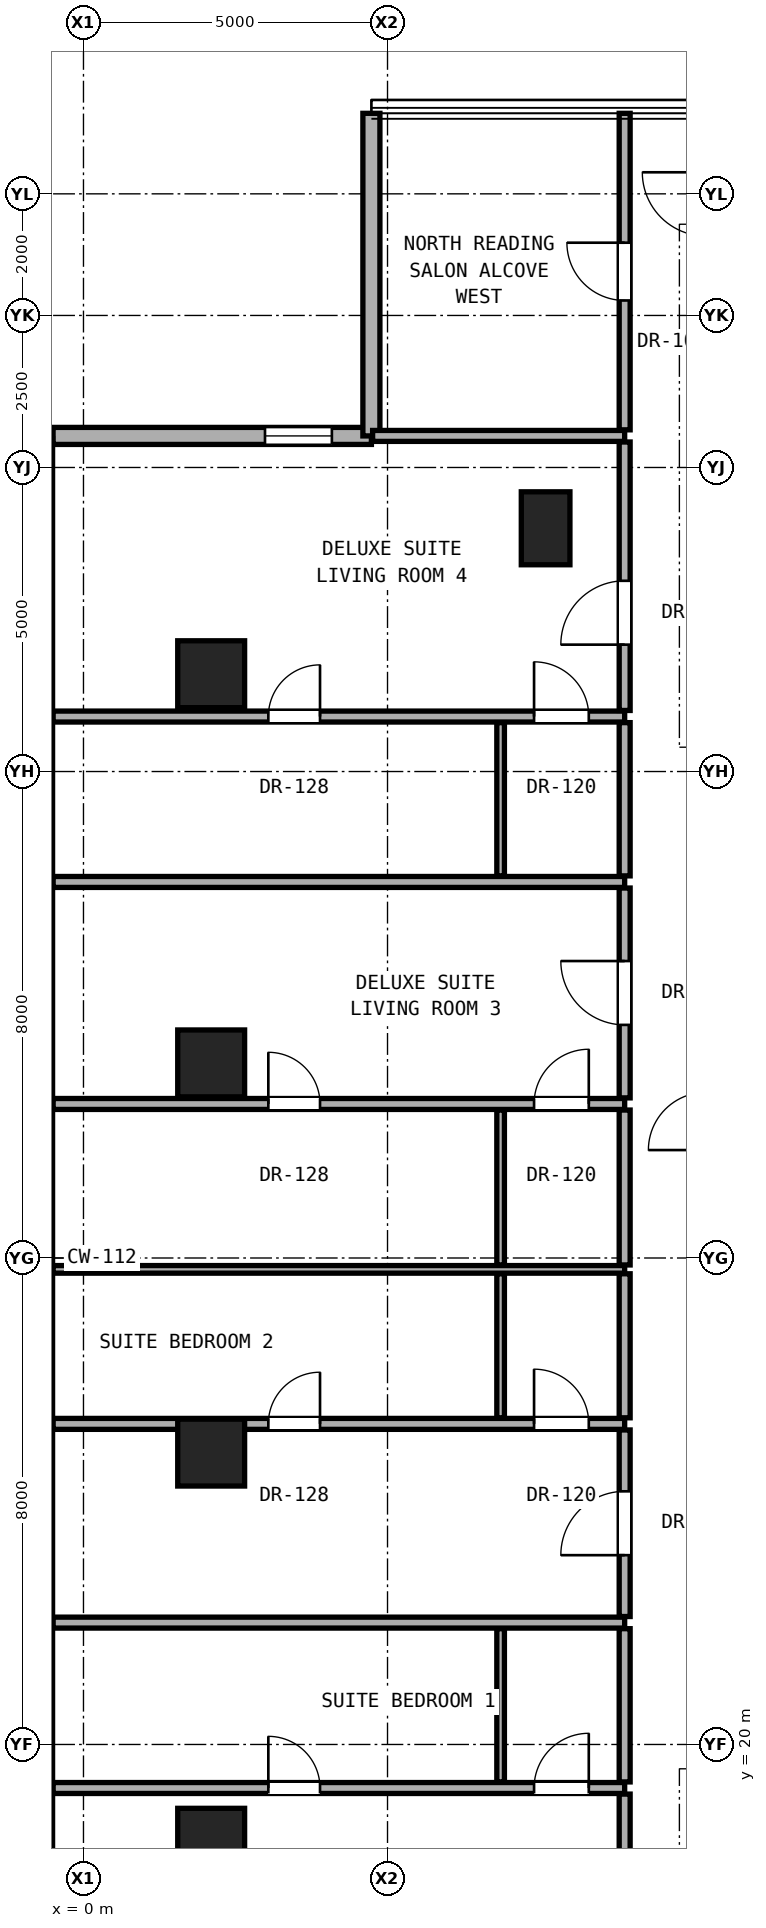
"""IFC4 building model, lengths in metres.
Left out: names, types, materials, properties, quantities, classifications, styles, units other than length and angle.
Written with IfcOpenShell. Run it as: python <this file> out.ifc"""

import sys

from ifc_helpers import new_model, si_unit, direction, frame, frame_2d, origin, origin_2d, place, context, subcontext, project, spatial, rectangle, hollow_rectangle, extrude, element, fill, save


model = new_model("IFC4")
c1 = context("Model", 3, precision=1e-05, world=origin(), true_north=direction((0.0, 1.0)))
c2 = subcontext(c1, "Body", "Model", "MODEL_VIEW")
j1 = project(units=[si_unit("LENGTHUNIT", "METRE"), si_unit("PLANEANGLEUNIT", "RADIAN")], contexts=[c1])
p1 = place(None, origin())
s1 = spatial("IfcSite", under=j1, at=p1, CompositionType="ELEMENT")
p2 = place(p1, origin())
s2 = spatial("IfcBuilding", under=s1, at=p2, CompositionType="ELEMENT")
p3 = place(p2, frame((0.0, 0.0, 98.3)))
s3 = spatial("IfcBuildingStorey", under=s2, at=p3, CompositionType="ELEMENT", Elevation=98.3)
for number, where, z_axis, x_axis in (
    (1, (2.1, 18.4, 0.0), (0.0, 0.0, 1.0), (1.0, 0.0, 0.0)),
    (2, (2.1, 24.8, 0.0), (0.0, 0.0, 1.0), (1.0, 0.0, 0.0)),
    (3, (2.1, 31.2, 0.0), (0.0, 0.0, 1.0), (1.0, 0.0, 0.0)),
    (4, (2.1, 37.6, 0.0), (0.0, 0.0, 1.0), (1.0, 0.0, 0.0)),
):
    element("IfcColumn", number, at=place(p3, frame(where, z_axis=z_axis, x_axis=x_axis)), inside=s3, PredefinedType="COLUMN", context=c2, shape_type="SweptSolid", body=[
        extrude(hollow_rectangle(XDim=1.1, YDim=1.1, WallThickness=0.06, at=origin_2d()), origin(), (0.0, 0.0, 1.0), 3.3),
    ])
p4 = place(p3, frame((7.6, 40.0, 0.0), z_axis=(0.0, 0.0, 1.0), x_axis=(1.0, 0.0, 0.0)))
e5 = element("IfcColumn", 5, at=p4, inside=s3, PredefinedType="PILASTER", context=c2, shape_type="SweptSolid", body=[
    extrude(rectangle(XDim=0.8, YDim=1.2, at=origin_2d()), origin(), (0.0, 0.0, 1.0), 3.3),
])
p5 = place(p3, frame((4.735, 41.519, 0.0), z_axis=(0.0, 0.0, 1.0), x_axis=(-1.0, 0.0, 0.0)))
e6 = element("IfcWall", 6, at=p5, inside=s3, PredefinedType="SOLIDWALL", context=c2, shape_type="SweptSolid", body=[
    extrude(rectangle(XDim=5.305, YDim=0.28, at=frame_2d((2.653, 0.0))), origin(), (0.0, 0.0, 1.0), 3.06),
])
p6 = place(p5, frame((0.65, 0.0, 0.85)))
e7 = element("IfcOpeningElement", 7, at=p6, cuts=e6, PredefinedType="OPENING", context=c2, shape_type="SweptSolid", body=[
    extrude(rectangle(XDim=1.1, YDim=2.0, at=frame_2d((0.55, 1.0))), frame((0.0, 0.15, 0.0), z_axis=(0.0, -1.0, 0.0), x_axis=(1.0, 0.0, 0.0)), (0.0, 0.0, 1.0), 0.3),
])
p7 = place(p3, frame((4.735, 46.824, 0.0), z_axis=(0.0, 0.0, 1.0), x_axis=(0.0, -1.0, 0.0)))
e8 = element("IfcWall", 8, at=p7, inside=s3, PredefinedType="SOLIDWALL", context=c2, shape_type="SweptSolid", body=[
    extrude(rectangle(XDim=5.305, YDim=0.28, at=frame_2d((2.652, 0.0))), origin(), (0.0, 0.0, 1.0), 3.06),
])
p8 = place(p3, frame((-0.57, 19.284, 0.0), z_axis=(0.0, 0.0, 1.0), x_axis=(1.0, 0.0, 0.0)))
e9 = element("IfcWall", 9, at=p8, inside=s3, PredefinedType="PARTITIONING", context=c2, shape_type="SweptSolid", body=[
    extrude(rectangle(XDim=9.47, YDim=0.18, at=frame_2d((4.735, 0.0))), origin(), (0.0, 0.0, 1.0), 2.145),
])
p9 = place(p8, frame((3.61, 0.0, 0.0)))
e10 = element("IfcOpeningElement", 10, at=p9, cuts=e9, PredefinedType="OPENING", context=c2, shape_type="SweptSolid", body=[
    extrude(rectangle(XDim=0.85, YDim=2.01, at=frame_2d((0.425, 1.005))), frame((0.0, 0.1, 0.0), z_axis=(0.0, -1.0, 0.0), x_axis=(1.0, 0.0, 0.0)), (0.0, 0.0, 1.0), 0.2),
])
p10 = place(p8, frame((7.98, 0.0, 0.0)))
e11 = element("IfcOpeningElement", 11, at=p10, cuts=e9, PredefinedType="OPENING", context=c2, shape_type="SweptSolid", body=[
    extrude(rectangle(XDim=0.9, YDim=2.1, at=frame_2d((0.45, 1.05))), frame((0.0, 0.1, 0.0), z_axis=(0.0, -1.0, 0.0), x_axis=(1.0, 0.0, 0.0)), (0.0, 0.0, 1.0), 0.2),
])
p11 = place(p3, frame((-0.57, 22.004, 0.0), z_axis=(0.0, 0.0, 1.0), x_axis=(1.0, 0.0, 0.0)))
e12 = element("IfcWall", 12, at=p11, inside=s3, PredefinedType="PARTITIONING", context=c2, shape_type="SweptSolid", body=[
    extrude(rectangle(XDim=9.47, YDim=0.18, at=frame_2d((4.735, 0.0))), origin(), (0.0, 0.0, 1.0), 2.145),
])
p12 = place(p3, frame((-0.57, 25.272, 0.0), z_axis=(0.0, 0.0, 1.0), x_axis=(1.0, 0.0, 0.0)))
e13 = element("IfcWall", 13, at=p12, inside=s3, PredefinedType="PARTITIONING", context=c2, shape_type="SweptSolid", body=[
    extrude(rectangle(XDim=9.47, YDim=0.18, at=frame_2d((4.735, 0.0))), origin(), (0.0, 0.0, 1.0), 2.145),
])
p13 = place(p12, frame((3.61, 0.0, 0.0)))
e14 = element("IfcOpeningElement", 14, at=p13, cuts=e13, PredefinedType="OPENING", context=c2, shape_type="SweptSolid", body=[
    extrude(rectangle(XDim=0.85, YDim=2.01, at=frame_2d((0.425, 1.005))), frame((0.0, 0.1, 0.0), z_axis=(0.0, -1.0, 0.0), x_axis=(1.0, 0.0, 0.0)), (0.0, 0.0, 1.0), 0.2),
])
p14 = place(p12, frame((7.98, 0.0, 0.0)))
e15 = element("IfcOpeningElement", 15, at=p14, cuts=e13, PredefinedType="OPENING", context=c2, shape_type="SweptSolid", body=[
    extrude(rectangle(XDim=0.9, YDim=2.1, at=frame_2d((0.45, 1.05))), frame((0.0, 0.1, 0.0), z_axis=(0.0, -1.0, 0.0), x_axis=(1.0, 0.0, 0.0)), (0.0, 0.0, 1.0), 0.2),
])
p15 = place(p3, frame((-0.57, 27.813, 0.0), z_axis=(0.0, 0.0, 1.0), x_axis=(1.0, 0.0, 0.0)))
e16 = element("IfcWall", 16, at=p15, inside=s3, PredefinedType="PARTITIONING", context=c2, shape_type="SweptSolid", body=[
    extrude(rectangle(XDim=9.47, YDim=0.125, at=frame_2d((4.735, 0.0))), origin(), (0.0, 0.0, 1.0), 2.145),
])
p16 = place(p3, frame((-0.57, 30.533, 0.0), z_axis=(0.0, 0.0, 1.0), x_axis=(1.0, 0.0, 0.0)))
e17 = element("IfcWall", 17, at=p16, inside=s3, PredefinedType="PARTITIONING", context=c2, shape_type="SweptSolid", body=[
    extrude(rectangle(XDim=9.47, YDim=0.18, at=frame_2d((4.735, 0.0))), origin(), (0.0, 0.0, 1.0), 2.145),
])
p17 = place(p16, frame((3.61, 0.0, 0.0)))
e18 = element("IfcOpeningElement", 18, at=p17, cuts=e17, PredefinedType="OPENING", context=c2, shape_type="SweptSolid", body=[
    extrude(rectangle(XDim=0.85, YDim=2.01, at=frame_2d((0.425, 1.005))), frame((0.0, 0.1, 0.0), z_axis=(0.0, -1.0, 0.0), x_axis=(1.0, 0.0, 0.0)), (0.0, 0.0, 1.0), 0.2),
])
p18 = place(p16, frame((7.98, 0.0, 0.0)))
e19 = element("IfcOpeningElement", 19, at=p18, cuts=e17, PredefinedType="OPENING", context=c2, shape_type="SweptSolid", body=[
    extrude(rectangle(XDim=0.9, YDim=2.1, at=frame_2d((0.45, 1.05))), frame((0.0, 0.1, 0.0), z_axis=(0.0, -1.0, 0.0), x_axis=(1.0, 0.0, 0.0)), (0.0, 0.0, 1.0), 0.2),
])
p19 = place(p3, frame((-0.57, 34.184, 0.0), z_axis=(0.0, 0.0, 1.0), x_axis=(1.0, 0.0, 0.0)))
e20 = element("IfcWall", 20, at=p19, inside=s3, PredefinedType="PARTITIONING", context=c2, shape_type="SweptSolid", body=[
    extrude(rectangle(XDim=9.47, YDim=0.18, at=frame_2d((4.735, 0.0))), origin(), (0.0, 0.0, 1.0), 2.145),
])
p20 = place(p3, frame((-0.57, 36.904, 0.0), z_axis=(0.0, 0.0, 1.0), x_axis=(1.0, 0.0, 0.0)))
e21 = element("IfcWall", 21, at=p20, inside=s3, PredefinedType="PARTITIONING", context=c2, shape_type="SweptSolid", body=[
    extrude(rectangle(XDim=9.47, YDim=0.18, at=frame_2d((4.735, 0.0))), origin(), (0.0, 0.0, 1.0), 2.145),
])
p21 = place(p20, frame((3.61, 0.0, 0.0)))
e22 = element("IfcOpeningElement", 22, at=p21, cuts=e21, PredefinedType="OPENING", context=c2, shape_type="SweptSolid", body=[
    extrude(rectangle(XDim=0.85, YDim=2.01, at=frame_2d((0.425, 1.005))), frame((0.0, 0.1, 0.0), z_axis=(0.0, -1.0, 0.0), x_axis=(1.0, 0.0, 0.0)), (0.0, 0.0, 1.0), 0.2),
])
p22 = place(p20, frame((7.98, 0.0, 0.0)))
e23 = element("IfcOpeningElement", 23, at=p22, cuts=e21, PredefinedType="OPENING", context=c2, shape_type="SweptSolid", body=[
    extrude(rectangle(XDim=0.9, YDim=2.1, at=frame_2d((0.45, 1.05))), frame((0.0, 0.1, 0.0), z_axis=(0.0, -1.0, 0.0), x_axis=(1.0, 0.0, 0.0)), (0.0, 0.0, 1.0), 0.2),
])
p23 = place(p3, frame((4.755, 41.519, 0.0), z_axis=(0.0, 0.0, 1.0), x_axis=(1.0, 0.0, 0.0)))
e24 = element("IfcWall", 24, at=p23, inside=s3, PredefinedType="PARTITIONING", context=c2, shape_type="SweptSolid", body=[
    extrude(rectangle(XDim=4.145, YDim=0.18, at=frame_2d((2.073, 0.0))), origin(), (0.0, 0.0, 1.0), 3.08),
])
p24 = place(p3, frame((6.86, 19.384, 0.0), z_axis=(0.0, 0.0, 1.0), x_axis=(0.0, 1.0, 0.0)))
e25 = element("IfcWall", 25, at=p24, inside=s3, PredefinedType="PARTITIONING", context=c2, shape_type="SweptSolid", body=[
    extrude(rectangle(XDim=2.52, YDim=0.125, at=frame_2d((1.26, 0.0))), origin(), (0.0, 0.0, 1.0), 3.08),
])
p25 = place(p3, frame((6.86, 25.372, 0.0), z_axis=(0.0, 0.0, 1.0), x_axis=(0.0, 1.0, 0.0)))
e26 = element("IfcWall", 26, at=p25, inside=s3, PredefinedType="PARTITIONING", context=c2, shape_type="SweptSolid", body=[
    extrude(rectangle(XDim=2.368, YDim=0.125, at=frame_2d((1.184, 0.0))), origin(), (0.0, 0.0, 1.0), 3.08),
])
p26 = place(p3, frame((6.86, 27.885, 0.0), z_axis=(0.0, 0.0, 1.0), x_axis=(0.0, 1.0, 0.0)))
e27 = element("IfcWall", 27, at=p26, inside=s3, PredefinedType="PARTITIONING", context=c2, shape_type="SweptSolid", body=[
    extrude(rectangle(XDim=2.548, YDim=0.125, at=frame_2d((1.274, 0.0))), origin(), (0.0, 0.0, 1.0), 3.08),
])
p27 = place(p3, frame((6.86, 34.284, 0.0), z_axis=(0.0, 0.0, 1.0), x_axis=(0.0, 1.0, 0.0)))
e28 = element("IfcWall", 28, at=p27, inside=s3, PredefinedType="PARTITIONING", context=c2, shape_type="SweptSolid", body=[
    extrude(rectangle(XDim=2.52, YDim=0.125, at=frame_2d((1.26, 0.0))), origin(), (0.0, 0.0, 1.0), 3.08),
])
p28 = place(p3, frame((8.9, 14.581, 0.0), z_axis=(0.0, 0.0, 1.0), x_axis=(0.0, 1.0, 0.0)))
e29 = element("IfcWall", 29, at=p28, inside=s3, PredefinedType="PARTITIONING", context=c2, shape_type="SweptSolid", body=[
    extrude(rectangle(XDim=4.603, YDim=0.18, at=frame_2d((2.302, 0.0))), origin(), (0.0, 0.0, 1.0), 2.456),
])
p29 = place(p28, frame((2.376, 0.0, 0.0)))
e30 = element("IfcOpeningElement", 30, at=p29, cuts=e29, PredefinedType="OPENING", context=c2, shape_type="SweptSolid", body=[
    extrude(rectangle(XDim=1.05, YDim=2.2, at=frame_2d((0.525, 1.1))), frame((0.0, 0.1, 0.0), z_axis=(0.0, -1.0, 0.0), x_axis=(1.0, 0.0, 0.0)), (0.0, 0.0, 1.0), 0.2),
])
p30 = place(p3, frame((8.9, 19.384, 0.0), z_axis=(0.0, 0.0, 1.0), x_axis=(0.0, 1.0, 0.0)))
e31 = element("IfcWall", 31, at=p30, inside=s3, PredefinedType="PARTITIONING", context=c2, shape_type="SweptSolid", body=[
    extrude(rectangle(XDim=2.52, YDim=0.18, at=frame_2d((1.26, 0.0))), origin(), (0.0, 0.0, 1.0), 3.08),
])
p31 = place(p3, frame((8.9, 22.104, 0.0), z_axis=(0.0, 0.0, 1.0), x_axis=(0.0, 1.0, 0.0)))
e32 = element("IfcWall", 32, at=p31, inside=s3, PredefinedType="PARTITIONING", context=c2, shape_type="SweptSolid", body=[
    extrude(rectangle(XDim=3.068, YDim=0.18, at=frame_2d((1.534, 0.0))), origin(), (0.0, 0.0, 1.0), 2.299),
])
p32 = place(p31, frame((1.009, 0.0, 0.0)))
e33 = element("IfcOpeningElement", 33, at=p32, cuts=e32, PredefinedType="OPENING", context=c2, shape_type="SweptSolid", body=[
    extrude(rectangle(XDim=1.05, YDim=2.2, at=frame_2d((0.525, 1.1))), frame((0.0, 0.1, 0.0), z_axis=(0.0, -1.0, 0.0), x_axis=(1.0, 0.0, 0.0)), (0.0, 0.0, 1.0), 0.2),
])
p33 = place(p3, frame((8.9, 25.372, 0.0), z_axis=(0.0, 0.0, 1.0), x_axis=(0.0, 1.0, 0.0)))
e34 = element("IfcWall", 34, at=p33, inside=s3, PredefinedType="PARTITIONING", context=c2, shape_type="SweptSolid", body=[
    extrude(rectangle(XDim=2.368, YDim=0.18, at=frame_2d((1.184, 0.0))), origin(), (0.0, 0.0, 1.0), 3.08),
])
p34 = place(p3, frame((8.9, 27.885, 0.0), z_axis=(0.0, 0.0, 1.0), x_axis=(0.0, 1.0, 0.0)))
e35 = element("IfcWall", 35, at=p34, inside=s3, PredefinedType="PARTITIONING", context=c2, shape_type="SweptSolid", body=[
    extrude(rectangle(XDim=2.548, YDim=0.18, at=frame_2d((1.274, 0.0))), origin(), (0.0, 0.0, 1.0), 3.08),
])
p35 = place(p3, frame((8.9, 30.633, 0.0), z_axis=(0.0, 0.0, 1.0), x_axis=(0.0, 1.0, 0.0)))
e36 = element("IfcWall", 36, at=p35, inside=s3, PredefinedType="PARTITIONING", context=c2, shape_type="SweptSolid", body=[
    extrude(rectangle(XDim=3.451, YDim=0.18, at=frame_2d((1.726, 0.0))), origin(), (0.0, 0.0, 1.0), 2.299),
])
p36 = place(p35, frame((1.2, 0.0, 0.0)))
e37 = element("IfcOpeningElement", 37, at=p36, cuts=e36, PredefinedType="OPENING", context=c2, shape_type="SweptSolid", body=[
    extrude(rectangle(XDim=1.05, YDim=2.2, at=frame_2d((0.525, 1.1))), frame((0.0, 0.1, 0.0), z_axis=(0.0, -1.0, 0.0), x_axis=(1.0, 0.0, 0.0)), (0.0, 0.0, 1.0), 0.2),
])
p37 = place(p3, frame((8.9, 34.284, 0.0), z_axis=(0.0, 0.0, 1.0), x_axis=(0.0, 1.0, 0.0)))
e38 = element("IfcWall", 38, at=p37, inside=s3, PredefinedType="PARTITIONING", context=c2, shape_type="SweptSolid", body=[
    extrude(rectangle(XDim=2.52, YDim=0.18, at=frame_2d((1.26, 0.0))), origin(), (0.0, 0.0, 1.0), 3.08),
])
p38 = place(p3, frame((8.9, 37.004, 0.0), z_axis=(0.0, 0.0, 1.0), x_axis=(0.0, 1.0, 0.0)))
e39 = element("IfcWall", 39, at=p38, inside=s3, PredefinedType="PARTITIONING", context=c2, shape_type="SweptSolid", body=[
    extrude(rectangle(XDim=4.415, YDim=0.18, at=frame_2d((2.208, 0.0))), origin(), (0.0, 0.0, 1.0), 2.456),
])
p39 = place(p38, frame((1.083, 0.0, 0.0)))
e40 = element("IfcOpeningElement", 40, at=p39, cuts=e39, PredefinedType="OPENING", context=c2, shape_type="SweptSolid", body=[
    extrude(rectangle(XDim=1.05, YDim=2.2, at=frame_2d((0.525, 1.1))), frame((0.0, 0.1, 0.0), z_axis=(0.0, -1.0, 0.0), x_axis=(1.0, 0.0, 0.0)), (0.0, 0.0, 1.0), 0.2),
])
p40 = place(p3, frame((8.9, 41.619, 0.0), z_axis=(0.0, 0.0, 1.0), x_axis=(0.0, 1.0, 0.0)))
e41 = element("IfcWall", 41, at=p40, inside=s3, PredefinedType="PARTITIONING", context=c2, shape_type="SweptSolid", body=[
    extrude(rectangle(XDim=5.205, YDim=0.18, at=frame_2d((2.603, 0.0))), origin(), (0.0, 0.0, 1.0), 3.08),
])
p41 = place(p40, frame((2.127, 0.0, 0.0)))
e42 = element("IfcOpeningElement", 42, at=p41, cuts=e41, PredefinedType="OPENING", context=c2, shape_type="SweptSolid", body=[
    extrude(rectangle(XDim=0.95, YDim=2.15, at=frame_2d((0.475, 1.075))), frame((0.0, 0.1, 0.0), z_axis=(0.0, -1.0, 0.0), x_axis=(1.0, 0.0, 0.0)), (0.0, 0.0, 1.0), 0.2),
])
p42 = place(p6, origin())
e43 = element("IfcWindow", 43, at=p42, inside=s3, PartitioningType="SINGLE_PANEL", PredefinedType="WINDOW", context=c2, shape_type="SweptSolid", body=[
    extrude(rectangle(XDim=1.1, YDim=2.0, at=frame_2d((0.55, 1.0))), frame((0.0, 0.03, 0.0), z_axis=(0.0, -1.0, 0.0), x_axis=(1.0, 0.0, 0.0)), (0.0, 0.0, 1.0), 0.06),
])
fill(e7, e43)
p43 = place(p9, origin())
e44 = element("IfcDoor", 44, at=p43, inside=s3, OperationType="SINGLE_SWING_LEFT", PredefinedType="DOOR", context=c2, shape_type="SweptSolid", body=[
    extrude(rectangle(XDim=0.85, YDim=2.01, at=frame_2d((0.425, 1.005))), frame((0.0, 0.025, 0.0), z_axis=(0.0, -1.0, 0.0), x_axis=(1.0, 0.0, 0.0)), (0.0, 0.0, 1.0), 0.05),
])
fill(e10, e44)
p44 = place(p10, origin())
e45 = element("IfcDoor", 45, at=p44, inside=s3, OperationType="SINGLE_SWING_RIGHT", PredefinedType="DOOR", context=c2, shape_type="SweptSolid", body=[
    extrude(rectangle(XDim=0.9, YDim=2.1, at=frame_2d((0.45, 1.05))), frame((0.0, 0.025, 0.0), z_axis=(0.0, -1.0, 0.0), x_axis=(1.0, 0.0, 0.0)), (0.0, 0.0, 1.0), 0.05),
])
fill(e11, e45)
p45 = place(p32, origin())
e46 = element("IfcDoor", 46, at=p45, inside=s3, OperationType="SINGLE_SWING_LEFT", PredefinedType="DOOR", context=c2, shape_type="SweptSolid", body=[
    extrude(rectangle(XDim=1.05, YDim=2.2, at=frame_2d((0.525, 1.1))), frame((0.0, 0.025, 0.0), z_axis=(0.0, -1.0, 0.0), x_axis=(1.0, 0.0, 0.0)), (0.0, 0.0, 1.0), 0.05),
])
fill(e33, e46)
p46 = place(p13, origin())
e47 = element("IfcDoor", 47, at=p46, inside=s3, OperationType="SINGLE_SWING_RIGHT", PredefinedType="DOOR", context=c2, shape_type="SweptSolid", body=[
    extrude(rectangle(XDim=0.85, YDim=2.01, at=frame_2d((0.425, 1.005))), frame((0.0, 0.025, 0.0), z_axis=(0.0, -1.0, 0.0), x_axis=(1.0, 0.0, 0.0)), (0.0, 0.0, 1.0), 0.05),
])
fill(e14, e47)
p47 = place(p14, origin())
e48 = element("IfcDoor", 48, at=p47, inside=s3, OperationType="SINGLE_SWING_LEFT", PredefinedType="DOOR", context=c2, shape_type="SweptSolid", body=[
    extrude(rectangle(XDim=0.9, YDim=2.1, at=frame_2d((0.45, 1.05))), frame((0.0, 0.025, 0.0), z_axis=(0.0, -1.0, 0.0), x_axis=(1.0, 0.0, 0.0)), (0.0, 0.0, 1.0), 0.05),
])
fill(e15, e48)
p48 = place(p36, origin())
e49 = element("IfcDoor", 49, at=p48, inside=s3, OperationType="SINGLE_SWING_RIGHT", PredefinedType="DOOR", context=c2, shape_type="SweptSolid", body=[
    extrude(rectangle(XDim=1.05, YDim=2.2, at=frame_2d((0.525, 1.1))), frame((0.0, 0.025, 0.0), z_axis=(0.0, -1.0, 0.0), x_axis=(1.0, 0.0, 0.0)), (0.0, 0.0, 1.0), 0.05),
])
fill(e37, e49)
p49 = place(p17, origin())
e50 = element("IfcDoor", 50, at=p49, inside=s3, OperationType="SINGLE_SWING_LEFT", PredefinedType="DOOR", context=c2, shape_type="SweptSolid", body=[
    extrude(rectangle(XDim=0.85, YDim=2.01, at=frame_2d((0.425, 1.005))), frame((0.0, 0.025, 0.0), z_axis=(0.0, -1.0, 0.0), x_axis=(1.0, 0.0, 0.0)), (0.0, 0.0, 1.0), 0.05),
])
fill(e18, e50)
p50 = place(p18, origin())
e51 = element("IfcDoor", 51, at=p50, inside=s3, OperationType="SINGLE_SWING_RIGHT", PredefinedType="DOOR", context=c2, shape_type="SweptSolid", body=[
    extrude(rectangle(XDim=0.9, YDim=2.1, at=frame_2d((0.45, 1.05))), frame((0.0, 0.025, 0.0), z_axis=(0.0, -1.0, 0.0), x_axis=(1.0, 0.0, 0.0)), (0.0, 0.0, 1.0), 0.05),
])
fill(e19, e51)
p51 = place(p39, origin())
e52 = element("IfcDoor", 52, at=p51, inside=s3, OperationType="SINGLE_SWING_LEFT", PredefinedType="DOOR", context=c2, shape_type="SweptSolid", body=[
    extrude(rectangle(XDim=1.05, YDim=2.2, at=frame_2d((0.525, 1.1))), frame((0.0, 0.025, 0.0), z_axis=(0.0, -1.0, 0.0), x_axis=(1.0, 0.0, 0.0)), (0.0, 0.0, 1.0), 0.05),
])
fill(e40, e52)
p52 = place(p21, origin())
e53 = element("IfcDoor", 53, at=p52, inside=s3, OperationType="SINGLE_SWING_RIGHT", PredefinedType="DOOR", context=c2, shape_type="SweptSolid", body=[
    extrude(rectangle(XDim=0.85, YDim=2.01, at=frame_2d((0.425, 1.005))), frame((0.0, 0.025, 0.0), z_axis=(0.0, -1.0, 0.0), x_axis=(1.0, 0.0, 0.0)), (0.0, 0.0, 1.0), 0.05),
])
fill(e22, e53)
p53 = place(p22, origin())
e54 = element("IfcDoor", 54, at=p53, inside=s3, OperationType="SINGLE_SWING_LEFT", PredefinedType="DOOR", context=c2, shape_type="SweptSolid", body=[
    extrude(rectangle(XDim=0.9, YDim=2.1, at=frame_2d((0.45, 1.05))), frame((0.0, 0.025, 0.0), z_axis=(0.0, -1.0, 0.0), x_axis=(1.0, 0.0, 0.0)), (0.0, 0.0, 1.0), 0.05),
])
fill(e23, e54)
p54 = place(p41, origin())
e55 = element("IfcDoor", 55, at=p54, inside=s3, OperationType="SINGLE_SWING_RIGHT", PredefinedType="DOOR", context=c2, shape_type="SweptSolid", body=[
    extrude(rectangle(XDim=0.95, YDim=2.15, at=frame_2d((0.475, 1.075))), frame((0.0, 0.025, 0.0), z_axis=(0.0, -1.0, 0.0), x_axis=(1.0, 0.0, 0.0)), (0.0, 0.0, 1.0), 0.05),
])
fill(e42, e55)
save(model, sys.argv[1])
